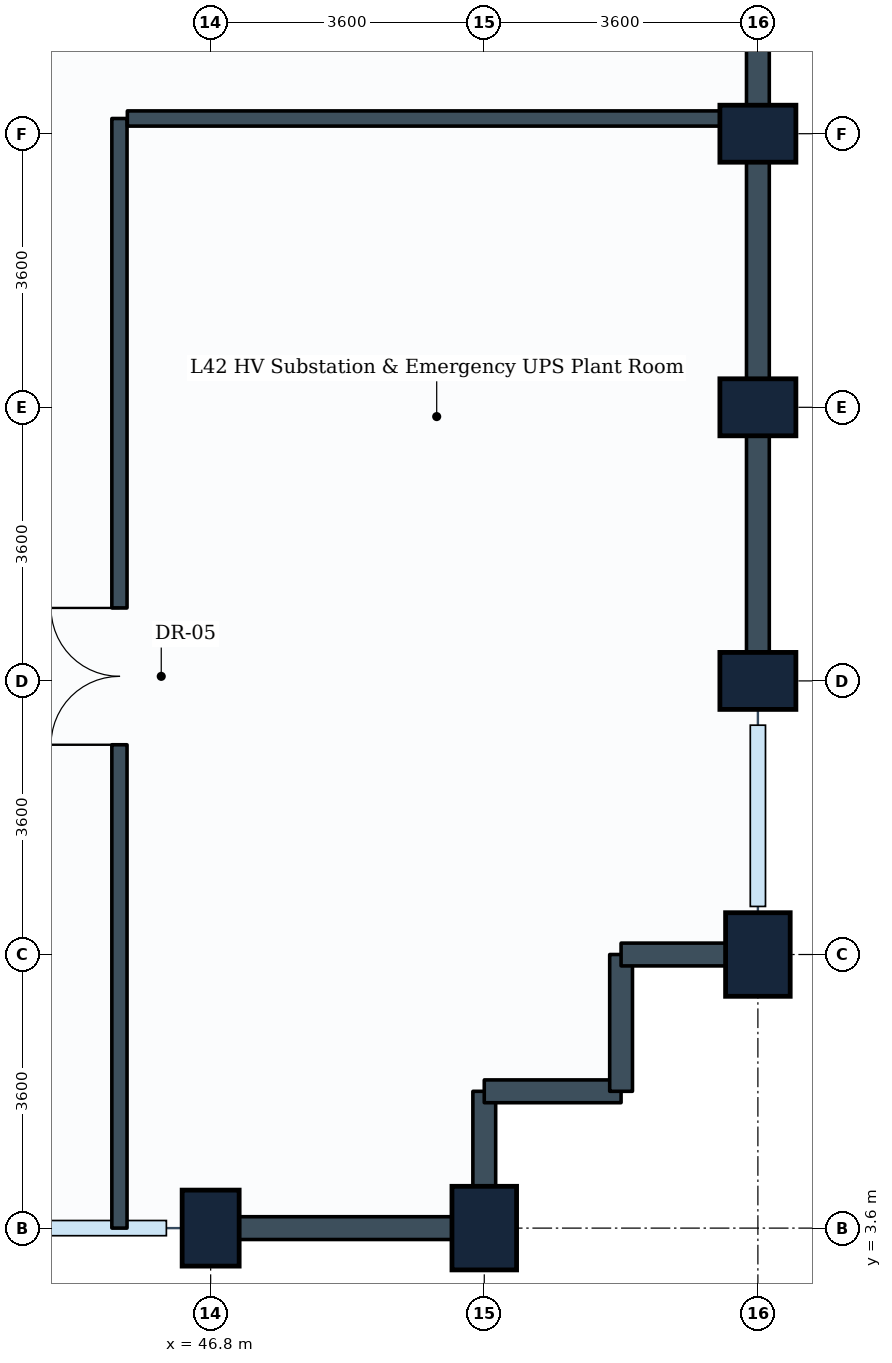
"""IFC4 building model, lengths in metres.
Left out: names, types, materials, properties, quantities, classifications, styles, units other than length and angle.
Written with IfcOpenShell. Run it as: python <this file> out.ifc"""

import sys

from ifc_helpers import new_model, si_unit, direction, frame, frame_2d, origin, origin_2d, place, context, subcontext, project, spatial, rectangle, extrude, element, fill, save


model = new_model("IFC4")
c1 = context("Model", 3, precision=1e-05, world=origin(), true_north=direction((0.0, 1.0)))
c2 = subcontext(c1, "Body", "Model", "MODEL_VIEW")
j1 = project(units=[si_unit("LENGTHUNIT", "METRE"), si_unit("PLANEANGLEUNIT", "RADIAN")], contexts=[c1])
p1 = place(None, origin())
s1 = spatial("IfcSite", under=j1, at=p1, CompositionType="ELEMENT")
p2 = place(p1, origin())
s2 = spatial("IfcBuilding", under=s1, at=p2, CompositionType="ELEMENT")
p3 = place(p2, frame((0.0, 0.0, 169.4)))
s3 = spatial("IfcBuildingStorey", under=s2, at=p3, CompositionType="ELEMENT", Elevation=169.4)
p4 = place(p3, frame((46.8, 3.6, 0.0), z_axis=(0.0, 0.0, 1.0), x_axis=(1.0, 0.0, 0.0)))
e1 = element("IfcColumn", 1, at=p4, inside=s3, PredefinedType="COLUMN", context=c2, shape_type="SweptSolid", body=[
    extrude(rectangle(XDim=0.75, YDim=1.0, at=origin_2d()), origin(), (0.0, 0.0, 1.0), 5.4),
])
for number, where, z_axis, x_axis in (
    (2, (50.4, 3.6, 0.0), (0.0, 0.0, 1.0), (1.0, 0.0, 0.0)),
    (3, (54.0, 7.2, 0.0), (0.0, 0.0, 1.0), (1.0, 0.0, 0.0)),
):
    element("IfcColumn", number, at=place(p3, frame(where, z_axis=z_axis, x_axis=x_axis)), inside=s3, PredefinedType="COLUMN", context=c2, shape_type="SweptSolid", body=[
        extrude(rectangle(XDim=0.85, YDim=1.1, at=origin_2d()), origin(), (0.0, 0.0, 1.0), 5.4),
    ])
for number, where, z_axis, x_axis in (
    (4, (54.0, 10.8, 0.0), (0.0, 0.0, 1.0), (0.0, 1.0, 0.0)),
    (5, (54.0, 14.4, 0.0), (0.0, 0.0, 1.0), (0.0, 1.0, 0.0)),
    (6, (54.0, 18.0, 0.0), (0.0, 0.0, 1.0), (0.0, 1.0, 0.0)),
):
    element("IfcColumn", number, at=place(p3, frame(where, z_axis=z_axis, x_axis=x_axis)), inside=s3, PredefinedType="COLUMN", context=c2, shape_type="SweptSolid", body=[
        extrude(rectangle(XDim=0.75, YDim=1.0, at=origin_2d()), origin(), (0.0, 0.0, 1.0), 5.4),
    ])
p5 = place(p3, frame((50.4, 3.6, 0.0), z_axis=(0.0, 0.0, 1.0), x_axis=(-1.0, 0.0, 0.0)))
e7 = element("IfcWall", 7, at=p5, inside=s3, PredefinedType="STANDARD", context=c2, shape_type="SweptSolid", body=[
    extrude(rectangle(XDim=3.6, YDim=0.3, at=frame_2d((1.8, 0.0))), origin(), (0.0, 0.0, 1.0), 3.58),
])
p6 = place(p3, frame((50.4, 5.4, 0.0), z_axis=(0.0, 0.0, 1.0), x_axis=(0.0, -1.0, 0.0)))
e8 = element("IfcWall", 8, at=p6, inside=s3, PredefinedType="STANDARD", context=c2, shape_type="SweptSolid", body=[
    extrude(rectangle(XDim=1.8, YDim=0.3, at=frame_2d((0.9, 0.0))), origin(), (0.0, 0.0, 1.0), 3.58),
])
p7 = place(p3, frame((52.2, 5.4, 0.0), z_axis=(0.0, 0.0, 1.0), x_axis=(-1.0, 0.0, 0.0)))
e9 = element("IfcWall", 9, at=p7, inside=s3, PredefinedType="STANDARD", context=c2, shape_type="SweptSolid", body=[
    extrude(rectangle(XDim=1.8, YDim=0.3, at=frame_2d((0.9, 0.0))), origin(), (0.0, 0.0, 1.0), 3.58),
])
p8 = place(p3, frame((52.2, 7.2, 0.0), z_axis=(0.0, 0.0, 1.0), x_axis=(0.0, -1.0, 0.0)))
e10 = element("IfcWall", 10, at=p8, inside=s3, PredefinedType="STANDARD", context=c2, shape_type="SweptSolid", body=[
    extrude(rectangle(XDim=1.8, YDim=0.3, at=frame_2d((0.9, 0.0))), origin(), (0.0, 0.0, 1.0), 5.065),
])
p9 = place(p3, frame((54.0, 7.2, 0.0), z_axis=(0.0, 0.0, 1.0), x_axis=(-1.0, 0.0, 0.0)))
e11 = element("IfcWall", 11, at=p9, inside=s3, PredefinedType="STANDARD", context=c2, shape_type="SweptSolid", body=[
    extrude(rectangle(XDim=1.8, YDim=0.3, at=frame_2d((0.9, 0.0))), origin(), (0.0, 0.0, 1.0), 4.03),
])
p10 = place(p3, frame((54.0, 14.4, 0.0), z_axis=(0.0, 0.0, 1.0), x_axis=(0.0, -1.0, 0.0)))
e12 = element("IfcWall", 12, at=p10, inside=s3, PredefinedType="STANDARD", context=c2, shape_type="SweptSolid", body=[
    extrude(rectangle(XDim=3.6, YDim=0.3, at=frame_2d((1.8, 0.0))), origin(), (0.0, 0.0, 1.0), 3.58),
])
p11 = place(p3, frame((54.0, 18.0, 0.0), z_axis=(0.0, 0.0, 1.0), x_axis=(0.0, -1.0, 0.0)))
e13 = element("IfcWall", 13, at=p11, inside=s3, PredefinedType="STANDARD", context=c2, shape_type="SweptSolid", body=[
    extrude(rectangle(XDim=3.6, YDim=0.3, at=frame_2d((1.8, 0.0))), origin(), (0.0, 0.0, 1.0), 3.58),
])
p12 = place(p3, frame((54.0, 21.6, 0.0), z_axis=(0.0, 0.0, 1.0), x_axis=(0.0, -1.0, 0.0)))
e14 = element("IfcWall", 14, at=p12, inside=s3, PredefinedType="STANDARD", context=c2, shape_type="SweptSolid", body=[
    extrude(rectangle(XDim=3.6, YDim=0.3, at=frame_2d((1.8, 0.0))), origin(), (0.0, 0.0, 1.0), 4.03),
])
p13 = place(p3, frame((45.6, 3.6, 0.0), z_axis=(0.0, 0.0, 1.0), x_axis=(0.0, 1.0, 0.0)))
e15 = element("IfcWall", 15, at=p13, inside=s3, PredefinedType="PARTITIONING", context=c2, shape_type="SweptSolid", body=[
    extrude(rectangle(XDim=14.6, YDim=0.2, at=frame_2d((7.3, 0.0))), origin(), (0.0, 0.0, 1.0), 3.58),
])
p14 = place(p13, frame((6.36, 0.0, 0.0)))
e16 = element("IfcOpeningElement", 16, at=p14, cuts=e15, PredefinedType="OPENING", context=c2, shape_type="SweptSolid", body=[
    extrude(rectangle(XDim=1.8, YDim=2.2, at=frame_2d((0.9, 1.1))), frame((0.0, 0.11, 0.0), z_axis=(0.0, -1.0, 0.0), x_axis=(1.0, 0.0, 0.0)), (0.0, 0.0, 1.0), 0.22),
])
p15 = place(p3, frame((45.704, 18.2, 0.0), z_axis=(0.0, 0.0, 1.0), x_axis=(1.0, 0.0, 0.0)))
e17 = element("IfcWall", 17, at=p15, inside=s3, PredefinedType="PARTITIONING", context=c2, shape_type="SweptSolid", body=[
    extrude(rectangle(XDim=8.142, YDim=0.2, at=frame_2d((4.071, 0.0))), origin(), (0.0, 0.0, 1.0), 3.58),
])
p16 = place(p14, origin())
e18 = element("IfcDoor", 18, at=p16, inside=s3, OperationType="DOUBLE_DOOR_SINGLE_SWING", PredefinedType="DOOR", context=c2, shape_type="SweptSolid", body=[
    extrude(rectangle(XDim=1.8, YDim=2.2, at=frame_2d((0.9, 1.1))), frame((0.0, 0.025, 0.0), z_axis=(0.0, -1.0, 0.0), x_axis=(1.0, 0.0, 0.0)), (0.0, 0.0, 1.0), 0.05),
])
fill(e16, e18)
save(model, sys.argv[1])
